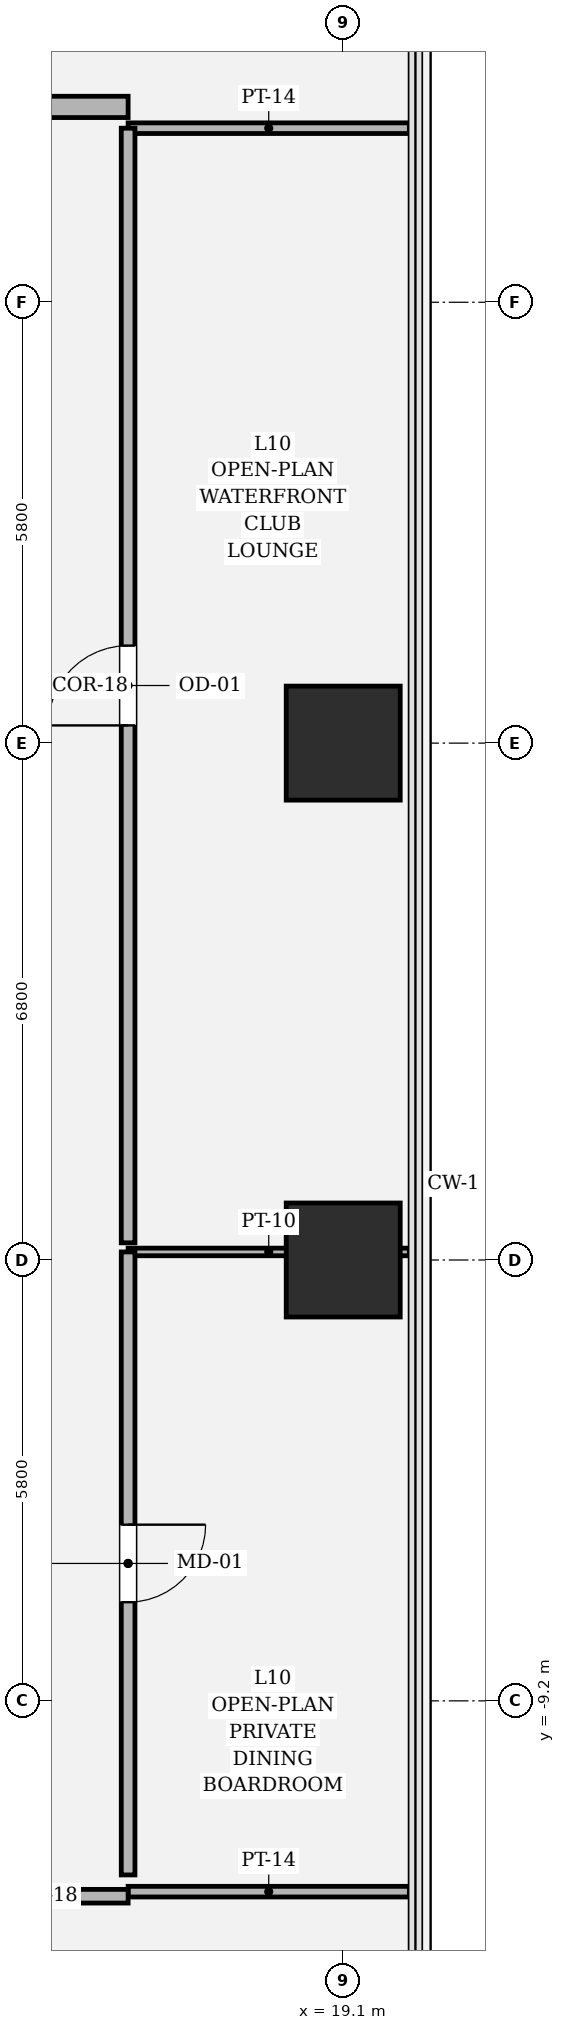
"""IFC4 building model, lengths in metres.
Left out: names, types, materials, properties, quantities, classifications, styles, units other than length and angle.
Written with IfcOpenShell. Run it as: python <this file> out.ifc"""

import sys

from ifc_helpers import new_model, si_unit, direction, frame, frame_2d, origin, origin_2d, place, context, subcontext, project, spatial, rectangle, hollow_rectangle, extrude, element, fill, save


model = new_model("IFC4")
c1 = context("Model", 3, precision=1e-05, world=origin(), true_north=direction((0.0, 1.0)))
c2 = subcontext(c1, "Body", "Model", "MODEL_VIEW")
j1 = project(units=[si_unit("LENGTHUNIT", "METRE"), si_unit("PLANEANGLEUNIT", "RADIAN")], contexts=[c1])
p1 = place(None, origin())
s1 = spatial("IfcSite", under=j1, at=p1, CompositionType="ELEMENT")
p2 = place(p1, origin())
s2 = spatial("IfcBuilding", under=s1, at=p2, CompositionType="ELEMENT")
p3 = place(p2, frame((0.0, 0.0, 48.45)))
s3 = spatial("IfcBuildingStorey", under=s2, at=p3, CompositionType="ELEMENT", Elevation=48.45)
for number, where, z_axis, x_axis in (
    (1, (19.1, -3.4, 0.0), (0.0, 0.0, 1.0), (1.0, 0.0, 0.0)),
    (2, (19.1, 3.4, 0.0), (0.0, 0.0, 1.0), (1.0, 0.0, 0.0)),
):
    element("IfcColumn", number, at=place(p3, frame(where, z_axis=z_axis, x_axis=x_axis)), inside=s3, PredefinedType="COLUMN", context=c2, shape_type="SweptSolid", body=[
        extrude(hollow_rectangle(XDim=1.5, YDim=1.5, WallThickness=0.045, at=origin_2d()), origin(), (0.0, 0.0, 1.0), 4.05),
    ])
p4 = place(p3, frame((16.27, -11.71, 0.0), z_axis=(0.0, 0.0, 1.0), x_axis=(1.0, 0.0, 0.0)))
e3 = element("IfcWall", 3, at=p4, inside=s3, PredefinedType="PARTITIONING", context=c2, shape_type="SweptSolid", body=[
    extrude(rectangle(XDim=3.7, YDim=0.14, at=frame_2d((1.85, 0.0))), origin(), (0.0, 0.0, 1.0), 3.104),
])
p5 = place(p3, frame((12.939, -11.77, 0.0), z_axis=(0.0, 0.0, 1.0), x_axis=(1.0, 0.0, 0.0)))
e4 = element("IfcWall", 4, at=p5, inside=s3, PredefinedType="PARTITIONING", context=c2, shape_type="SweptSolid", body=[
    extrude(rectangle(XDim=3.331, YDim=0.18, at=frame_2d((1.666, 0.0))), origin(), (0.0, 0.0, 1.0), 3.354),
])
p6 = place(p5, frame((1.14, 0.0, 0.0)))
e5 = element("IfcOpeningElement", 5, at=p6, cuts=e4, PredefinedType="OPENING", context=c2, shape_type="SweptSolid", body=[
    extrude(rectangle(XDim=1.05, YDim=2.2, at=frame_2d((0.525, 1.1))), frame((0.0, 0.1, 0.0), z_axis=(0.0, -1.0, 0.0), x_axis=(1.0, 0.0, 0.0)), (0.0, 0.0, 1.0), 0.2),
])
p7 = place(p3, frame((16.27, -3.294, 0.0), z_axis=(0.0, 0.0, 1.0), x_axis=(1.0, 0.0, 0.0)))
e6 = element("IfcWall", 6, at=p7, inside=s3, PredefinedType="PARTITIONING", context=c2, shape_type="SweptSolid", body=[
    extrude(rectangle(XDim=3.7, YDim=0.1, at=frame_2d((1.85, 0.0))), origin(), (0.0, 0.0, 1.0), 3.104),
])
p8 = place(p3, frame((16.27, -11.49, 0.0), z_axis=(0.0, 0.0, 1.0), x_axis=(0.0, 1.0, 0.0)))
e7 = element("IfcWall", 7, at=p8, inside=s3, PredefinedType="PARTITIONING", context=c2, shape_type="SweptSolid", body=[
    extrude(rectangle(XDim=8.196, YDim=0.18, at=frame_2d((4.098, 0.0))), origin(), (0.0, 0.0, 1.0), 3.104),
])
p9 = place(p8, frame((3.588, 0.0, 0.0)))
e8 = element("IfcOpeningElement", 8, at=p9, cuts=e7, PredefinedType="OPENING", context=c2, shape_type="SweptSolid", body=[
    extrude(rectangle(XDim=1.02, YDim=2.2, at=frame_2d((0.51, 1.1))), frame((0.0, 0.1, 0.0), z_axis=(0.0, -1.0, 0.0), x_axis=(1.0, 0.0, 0.0)), (0.0, 0.0, 1.0), 0.2),
])
p10 = place(p3, frame((16.27, 11.49, 0.0), z_axis=(0.0, 0.0, 1.0), x_axis=(1.0, 0.0, 0.0)))
e9 = element("IfcWall", 9, at=p10, inside=s3, PredefinedType="PARTITIONING", context=c2, shape_type="SweptSolid", body=[
    extrude(rectangle(XDim=3.7, YDim=0.14, at=frame_2d((1.85, 0.0))), origin(), (0.0, 0.0, 1.0), 3.104),
])
p11 = place(p3, frame((16.27, -3.174, 0.0), z_axis=(0.0, 0.0, 1.0), x_axis=(0.0, 1.0, 0.0)))
e10 = element("IfcWall", 10, at=p11, inside=s3, PredefinedType="PARTITIONING", context=c2, shape_type="SweptSolid", body=[
    extrude(rectangle(XDim=14.664, YDim=0.18, at=frame_2d((7.332, 0.0))), origin(), (0.0, 0.0, 1.0), 3.104),
])
p12 = place(p11, frame((6.807, 0.0, 0.0)))
e11 = element("IfcOpeningElement", 11, at=p12, cuts=e10, PredefinedType="OPENING", context=c2, shape_type="SweptSolid", body=[
    extrude(rectangle(XDim=1.05, YDim=2.2, at=frame_2d((0.525, 1.1))), frame((0.0, 0.1, 0.0), z_axis=(0.0, -1.0, 0.0), x_axis=(1.0, 0.0, 0.0)), (0.0, 0.0, 1.0), 0.2),
])
p13 = place(p3, frame((16.27, 11.77, 0.0), z_axis=(0.0, 0.0, 1.0), x_axis=(-1.0, 0.0, 0.0)))
e12 = element("IfcWall", 12, at=p13, inside=s3, PredefinedType="SOLIDWALL", context=c2, shape_type="SweptSolid", body=[
    extrude(rectangle(XDim=2.29, YDim=0.28, at=frame_2d((1.145, 0.0))), origin(), (0.0, 0.0, 1.0), 3.354),
])
p14 = place(p9, origin())
e13 = element("IfcDoor", 13, at=p14, inside=s3, OperationType="SINGLE_SWING_RIGHT", PredefinedType="DOOR", context=c2, shape_type="SweptSolid", body=[
    extrude(rectangle(XDim=1.02, YDim=2.2, at=frame_2d((0.51, 1.1))), frame((0.0, 0.025, 0.0), z_axis=(0.0, -1.0, 0.0), x_axis=(1.0, 0.0, 0.0)), (0.0, 0.0, 1.0), 0.05),
])
fill(e8, e13)
p15 = place(p12, origin())
e14 = element("IfcDoor", 14, at=p15, inside=s3, OperationType="SINGLE_SWING_LEFT", PredefinedType="DOOR", context=c2, shape_type="SweptSolid", body=[
    extrude(rectangle(XDim=1.05, YDim=2.2, at=frame_2d((0.525, 1.1))), frame((0.0, 0.025, 0.0), z_axis=(0.0, -1.0, 0.0), x_axis=(1.0, 0.0, 0.0)), (0.0, 0.0, 1.0), 0.05),
])
fill(e11, e14)
save(model, sys.argv[1])
